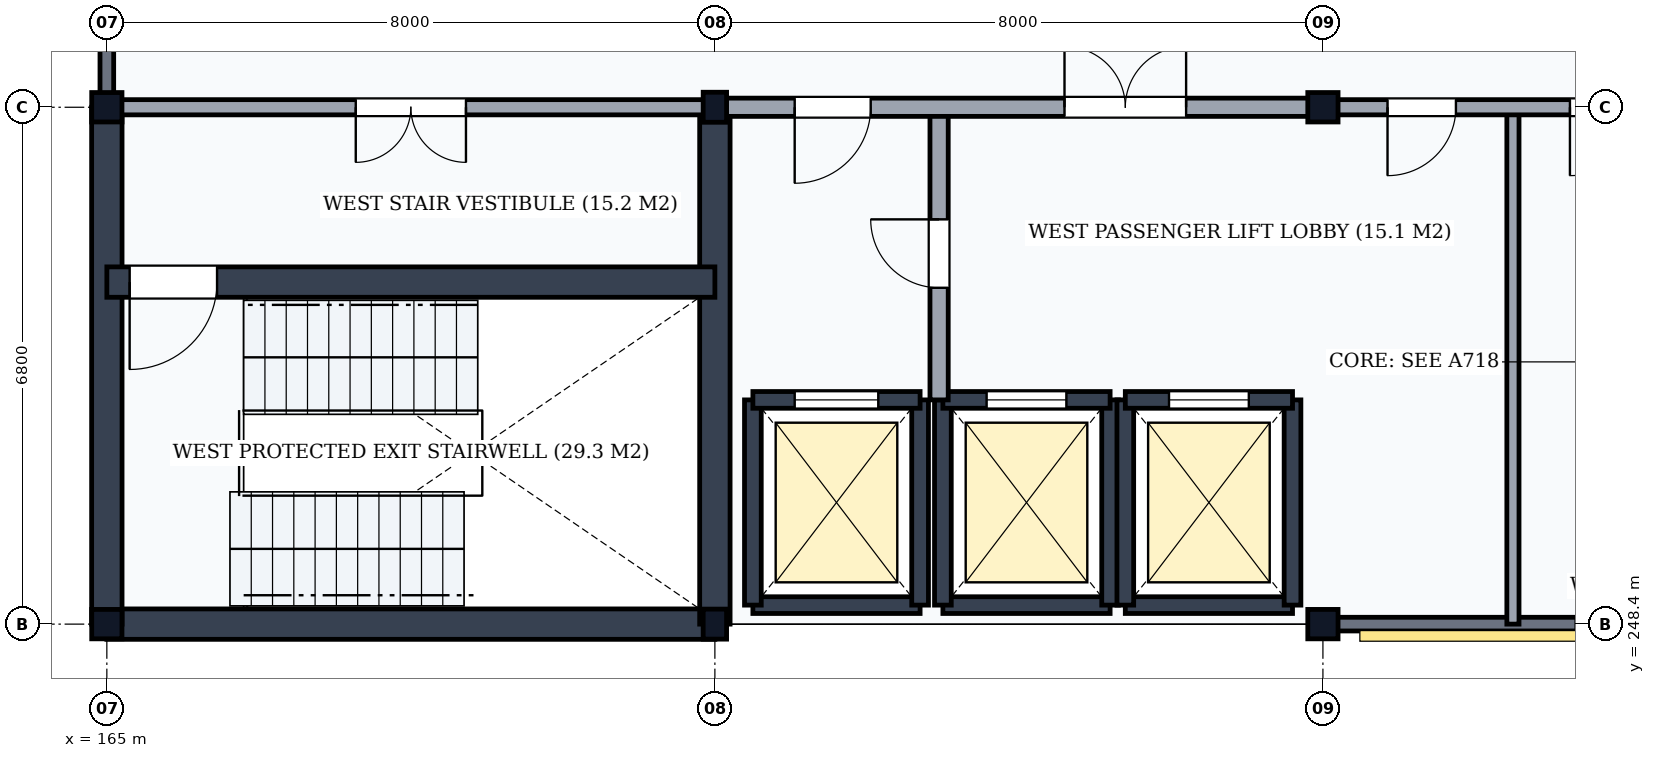
"""IFC4 building model, lengths in metres.
Left out: names, types, materials, properties, quantities, classifications, styles, units other than length and angle.
Written with IfcOpenShell. Run it as: python <this file> out.ifc"""

import sys

from ifc_helpers import new_model, si_unit, direction, frame, frame_2d, origin, origin_2d, place, context, subcontext, project, spatial, rectangle, i_section, extrude, element, fill, save


model = new_model("IFC4")
c1 = context("Model", 3, precision=1e-05, world=origin(), true_north=direction((0.0, 1.0)))
c2 = subcontext(c1, "Body", "Model", "MODEL_VIEW")
j1 = project(units=[si_unit("LENGTHUNIT", "METRE"), si_unit("PLANEANGLEUNIT", "RADIAN")], contexts=[c1])
p1 = place(None, origin())
s1 = spatial("IfcSite", under=j1, at=p1, CompositionType="ELEMENT")
p2 = place(p1, origin())
s2 = spatial("IfcBuilding", under=s1, at=p2, CompositionType="ELEMENT")
p3 = place(p2, frame((0.0, 0.0, 32.1)))
s3 = spatial("IfcBuildingStorey", under=s2, at=p3, CompositionType="ELEMENT", Elevation=32.1)
for number, where, z_axis, x_axis in (
    (1, (165.0, 248.4, 0.0), (0.0, 0.0, 1.0), (1.0, 0.0, 0.0)),
    (2, (165.0, 255.2, 0.0), (0.0, 0.0, 1.0), (1.0, 0.0, 0.0)),
):
    element("IfcColumn", number, at=place(p3, frame(where, z_axis=z_axis, x_axis=x_axis)), inside=s3, PredefinedType="COLUMN", context=c2, shape_type="SweptSolid", body=[
        extrude(i_section(OverallWidth=0.398, OverallDepth=0.387, WebThickness=0.021, FlangeThickness=0.033, FilletRadius=0.015, at=origin_2d()), origin(), (0.0, 0.0, 1.0), 3.9),
    ])
for number, where, z_axis, x_axis in (
    (3, (173.0, 248.4, 0.0), (0.0, 0.0, 1.0), (1.0, 0.0, 0.0)),
    (4, (173.0, 255.2, 0.0), (0.0, 0.0, 1.0), (1.0, 0.0, 0.0)),
):
    element("IfcColumn", number, at=place(p3, frame(where, z_axis=z_axis, x_axis=x_axis)), inside=s3, PredefinedType="COLUMN", context=c2, shape_type="SweptSolid", body=[
        extrude(i_section(OverallWidth=0.308, OverallDepth=0.395, WebThickness=0.021, FlangeThickness=0.04, FilletRadius=0.027, at=origin_2d()), origin(), (0.0, 0.0, 1.0), 3.9),
    ])
for number, where, z_axis, x_axis in (
    (5, (181.0, 248.4, 0.0), (0.0, 0.0, 1.0), (1.0, 0.0, 0.0)),
    (6, (181.0, 255.2, 0.0), (0.0, 0.0, 1.0), (1.0, 0.0, 0.0)),
):
    element("IfcColumn", number, at=place(p3, frame(where, z_axis=z_axis, x_axis=x_axis)), inside=s3, PredefinedType="COLUMN", context=c2, shape_type="SweptSolid", body=[
        extrude(i_section(OverallWidth=0.398, OverallDepth=0.387, WebThickness=0.021, FlangeThickness=0.033, FilletRadius=0.015, at=origin_2d()), origin(), (0.0, 0.0, 1.0), 3.9),
    ])
p4 = place(p3, frame((181.006, 248.4, 0.0), z_axis=(0.0, 0.0, 1.0), x_axis=(1.0, 0.0, 0.0)))
e7 = element("IfcWall", 7, at=p4, inside=s3, PredefinedType="SOLIDWALL", context=c2, shape_type="SweptSolid", body=[
    extrude(rectangle(XDim=7.988, YDim=0.18, at=frame_2d((3.994, 0.0))), origin(), (0.0, 0.0, 1.0), 3.368),
])
p5 = place(p4, frame((3.319, 0.0, 0.85)))
e8 = element("IfcOpeningElement", 8, at=p5, cuts=e7, PredefinedType="OPENING", context=c2, shape_type="SweptSolid", body=[
    extrude(rectangle(XDim=0.75, YDim=2.0, at=frame_2d((0.375, 1.0))), frame((0.0, 0.105, 0.0), z_axis=(0.0, -1.0, 0.0), x_axis=(1.0, 0.0, 0.0)), (0.0, 0.0, 1.0), 0.21),
])
p6 = place(p3, frame((165.0, 255.206, 0.0), z_axis=(0.0, 0.0, 1.0), x_axis=(0.0, 1.0, 0.0)))
e9 = element("IfcWall", 9, at=p6, inside=s3, PredefinedType="SOLIDWALL", context=c2, shape_type="SweptSolid", body=[
    extrude(rectangle(XDim=7.588, YDim=0.18, at=frame_2d((3.794, 0.0))), origin(), (0.0, 0.0, 1.0), 3.408),
])
p7 = place(p3, frame((165.0, 248.4, 0.0), z_axis=(0.0, 0.0, 1.0), x_axis=(1.0, 0.0, 0.0)))
e10 = element("IfcWall", 10, at=p7, inside=s3, PredefinedType="SHEAR", context=c2, shape_type="SweptSolid", body=[
    extrude(rectangle(XDim=8.0, YDim=0.4, at=frame_2d((4.0, 0.0))), origin(), (0.0, 0.0, 1.0), 3.68),
])
for number, where, z_axis, x_axis in (
    (11, (165.0, 248.4, 0.0), (0.0, 0.0, 1.0), (0.0, 1.0, 0.0)),
    (12, (173.0, 248.4, 0.0), (0.0, 0.0, 1.0), (0.0, 1.0, 0.0)),
):
    element("IfcWall", number, at=place(p3, frame(where, z_axis=z_axis, x_axis=x_axis)), inside=s3, PredefinedType="SHEAR", context=c2, shape_type="SweptSolid", body=[
        extrude(rectangle(XDim=6.8, YDim=0.4, at=frame_2d((3.4, 0.0))), origin(), (0.0, 0.0, 1.0), 3.68),
    ])
p8 = place(p3, frame((165.0, 252.9, 0.0), z_axis=(0.0, 0.0, 1.0), x_axis=(1.0, 0.0, 0.0)))
e13 = element("IfcWall", 13, at=p8, inside=s3, PredefinedType="SHEAR", context=c2, shape_type="SweptSolid", body=[
    extrude(rectangle(XDim=8.0, YDim=0.4, at=frame_2d((4.0, 0.0))), origin(), (0.0, 0.0, 1.0), 3.68),
])
p9 = place(p8, frame((0.3, 0.0, 0.0)))
e14 = element("IfcOpeningElement", 14, at=p9, cuts=e13, PredefinedType="OPENING", context=c2, shape_type="SweptSolid", body=[
    extrude(rectangle(XDim=1.15, YDim=2.15, at=frame_2d((0.575, 1.075))), frame((0.0, 0.215, 0.0), z_axis=(0.0, -1.0, 0.0), x_axis=(1.0, 0.0, 0.0)), (0.0, 0.0, 1.0), 0.43),
])
p10 = place(p3, frame((165.0, 255.2, 0.0), z_axis=(0.0, 0.0, 1.0), x_axis=(1.0, 0.0, 0.0)))
e15 = element("IfcWall", 15, at=p10, inside=s3, PredefinedType="PARTITIONING", context=c2, shape_type="SweptSolid", body=[
    extrude(rectangle(XDim=8.0, YDim=0.2, at=frame_2d((4.0, 0.0))), origin(), (0.0, 0.0, 1.0), 3.078),
])
p11 = place(p10, frame((3.275, 0.0, 0.0)))
e16 = element("IfcOpeningElement", 16, at=p11, cuts=e15, PredefinedType="OPENING", context=c2, shape_type="SweptSolid", body=[
    extrude(rectangle(XDim=1.45, YDim=2.2, at=frame_2d((0.725, 1.1))), frame((0.0, 0.115, 0.0), z_axis=(0.0, -1.0, 0.0), x_axis=(1.0, 0.0, 0.0)), (0.0, 0.0, 1.0), 0.23),
])
p12 = place(p3, frame((173.5, 248.65, 0.0), z_axis=(0.0, 0.0, 1.0), x_axis=(1.0, 0.0, 0.0)))
e17 = element("IfcWall", 17, at=p12, inside=s3, PredefinedType="SHEAR", context=c2, shape_type="SweptSolid", body=[
    extrude(rectangle(XDim=2.2, YDim=0.22, at=frame_2d((1.1, 0.0))), origin(), (0.0, 0.0, 1.0), 3.68),
])
for number, where, z_axis, x_axis in (
    (18, (173.5, 248.65, 0.0), (0.0, 0.0, 1.0), (0.0, 1.0, 0.0)),
    (19, (175.7, 248.65, 0.0), (0.0, 0.0, 1.0), (0.0, 1.0, 0.0)),
):
    element("IfcWall", number, at=place(p3, frame(where, z_axis=z_axis, x_axis=x_axis)), inside=s3, PredefinedType="SHEAR", context=c2, shape_type="SweptSolid", body=[
        extrude(rectangle(XDim=2.7, YDim=0.22, at=frame_2d((1.35, 0.0))), origin(), (0.0, 0.0, 1.0), 3.68),
    ])
p13 = place(p3, frame((173.5, 251.35, 0.0), z_axis=(0.0, 0.0, 1.0), x_axis=(1.0, 0.0, 0.0)))
e20 = element("IfcWall", 20, at=p13, inside=s3, PredefinedType="SHEAR", context=c2, shape_type="SweptSolid", body=[
    extrude(rectangle(XDim=2.2, YDim=0.22, at=frame_2d((1.1, 0.0))), origin(), (0.0, 0.0, 1.0), 3.68),
])
p14 = place(p13, frame((0.55, 0.0, 0.0)))
e21 = element("IfcOpeningElement", 21, at=p14, cuts=e20, PredefinedType="OPENING", context=c2, shape_type="SweptSolid", body=[
    extrude(rectangle(XDim=1.1, YDim=2.15, at=frame_2d((0.55, 1.075))), frame((0.0, 0.125, 0.0), z_axis=(0.0, -1.0, 0.0), x_axis=(1.0, 0.0, 0.0)), (0.0, 0.0, 1.0), 0.25),
])
p15 = place(p3, frame((176.0, 248.65, 0.0), z_axis=(0.0, 0.0, 1.0), x_axis=(1.0, 0.0, 0.0)))
e22 = element("IfcWall", 22, at=p15, inside=s3, PredefinedType="SHEAR", context=c2, shape_type="SweptSolid", body=[
    extrude(rectangle(XDim=2.2, YDim=0.22, at=frame_2d((1.1, 0.0))), origin(), (0.0, 0.0, 1.0), 3.68),
])
for number, where, z_axis, x_axis in (
    (23, (176.0, 248.65, 0.0), (0.0, 0.0, 1.0), (0.0, 1.0, 0.0)),
    (24, (178.2, 248.65, 0.0), (0.0, 0.0, 1.0), (0.0, 1.0, 0.0)),
):
    element("IfcWall", number, at=place(p3, frame(where, z_axis=z_axis, x_axis=x_axis)), inside=s3, PredefinedType="SHEAR", context=c2, shape_type="SweptSolid", body=[
        extrude(rectangle(XDim=2.7, YDim=0.22, at=frame_2d((1.35, 0.0))), origin(), (0.0, 0.0, 1.0), 3.68),
    ])
p16 = place(p3, frame((176.0, 251.35, 0.0), z_axis=(0.0, 0.0, 1.0), x_axis=(1.0, 0.0, 0.0)))
e25 = element("IfcWall", 25, at=p16, inside=s3, PredefinedType="SHEAR", context=c2, shape_type="SweptSolid", body=[
    extrude(rectangle(XDim=2.2, YDim=0.22, at=frame_2d((1.1, 0.0))), origin(), (0.0, 0.0, 1.0), 3.68),
])
p17 = place(p16, frame((0.575, 0.0, 0.0)))
e26 = element("IfcOpeningElement", 26, at=p17, cuts=e25, PredefinedType="OPENING", context=c2, shape_type="SweptSolid", body=[
    extrude(rectangle(XDim=1.05, YDim=2.15, at=frame_2d((0.525, 1.075))), frame((0.0, 0.125, 0.0), z_axis=(0.0, -1.0, 0.0), x_axis=(1.0, 0.0, 0.0)), (0.0, 0.0, 1.0), 0.25),
])
p18 = place(p3, frame((178.4, 248.65, 0.0), z_axis=(0.0, 0.0, 1.0), x_axis=(1.0, 0.0, 0.0)))
e27 = element("IfcWall", 27, at=p18, inside=s3, PredefinedType="SHEAR", context=c2, shape_type="SweptSolid", body=[
    extrude(rectangle(XDim=2.2, YDim=0.22, at=frame_2d((1.1, 0.0))), origin(), (0.0, 0.0, 1.0), 3.68),
])
for number, where, z_axis, x_axis in (
    (28, (178.4, 248.65, 0.0), (0.0, 0.0, 1.0), (0.0, 1.0, 0.0)),
    (29, (180.6, 248.65, 0.0), (0.0, 0.0, 1.0), (0.0, 1.0, 0.0)),
):
    element("IfcWall", number, at=place(p3, frame(where, z_axis=z_axis, x_axis=x_axis)), inside=s3, PredefinedType="SHEAR", context=c2, shape_type="SweptSolid", body=[
        extrude(rectangle(XDim=2.7, YDim=0.22, at=frame_2d((1.35, 0.0))), origin(), (0.0, 0.0, 1.0), 3.68),
    ])
p19 = place(p3, frame((178.4, 251.35, 0.0), z_axis=(0.0, 0.0, 1.0), x_axis=(1.0, 0.0, 0.0)))
e30 = element("IfcWall", 30, at=p19, inside=s3, PredefinedType="SHEAR", context=c2, shape_type="SweptSolid", body=[
    extrude(rectangle(XDim=2.2, YDim=0.22, at=frame_2d((1.1, 0.0))), origin(), (0.0, 0.0, 1.0), 3.68),
])
p20 = place(p19, frame((0.575, 0.0, 0.0)))
e31 = element("IfcOpeningElement", 31, at=p20, cuts=e30, PredefinedType="OPENING", context=c2, shape_type="SweptSolid", body=[
    extrude(rectangle(XDim=1.05, YDim=2.15, at=frame_2d((0.525, 1.075))), frame((0.0, 0.125, 0.0), z_axis=(0.0, -1.0, 0.0), x_axis=(1.0, 0.0, 0.0)), (0.0, 0.0, 1.0), 0.25),
])
p21 = place(p3, frame((175.95, 251.35, 0.0), z_axis=(0.0, 0.0, 1.0), x_axis=(0.0, 1.0, 0.0)))
e32 = element("IfcWall", 32, at=p21, inside=s3, PredefinedType="PARTITIONING", context=c2, shape_type="SweptSolid", body=[
    extrude(rectangle(XDim=3.85, YDim=0.24, at=frame_2d((1.925, 0.0))), origin(), (0.0, 0.0, 1.0), 3.68),
])
p22 = place(p21, frame((1.475, 0.0, 0.0)))
e33 = element("IfcOpeningElement", 33, at=p22, cuts=e32, PredefinedType="OPENING", context=c2, shape_type="SweptSolid", body=[
    extrude(rectangle(XDim=0.9, YDim=2.1, at=frame_2d((0.45, 1.05))), frame((0.0, 0.135, 0.0), z_axis=(0.0, -1.0, 0.0), x_axis=(1.0, 0.0, 0.0)), (0.0, 0.0, 1.0), 0.27),
])
p23 = place(p3, frame((183.5, 248.4, 0.0), z_axis=(0.0, 0.0, 1.0), x_axis=(0.0, 1.0, 0.0)))
e34 = element("IfcWall", 34, at=p23, inside=s3, PredefinedType="PARTITIONING", context=c2, shape_type="SweptSolid", body=[
    extrude(rectangle(XDim=6.8, YDim=0.16, at=frame_2d((3.4, 0.0))), origin(), (0.0, 0.0, 1.0), 3.68),
])
p24 = place(p3, frame((173.0, 255.2, 0.0), z_axis=(0.0, 0.0, 1.0), x_axis=(1.0, 0.0, 0.0)))
e35 = element("IfcWall", 35, at=p24, inside=s3, PredefinedType="PARTITIONING", context=c2, shape_type="SweptSolid", body=[
    extrude(rectangle(XDim=8.0, YDim=0.24, at=frame_2d((4.0, 0.0))), origin(), (0.0, 0.0, 1.0), 3.078),
])
p25 = place(p24, frame((1.05, 0.0, 0.0)))
e36 = element("IfcOpeningElement", 36, at=p25, cuts=e35, PredefinedType="OPENING", context=c2, shape_type="SweptSolid", body=[
    extrude(rectangle(XDim=1.0, YDim=2.1, at=frame_2d((0.5, 1.05))), frame((0.0, 0.135, 0.0), z_axis=(0.0, -1.0, 0.0), x_axis=(1.0, 0.0, 0.0)), (0.0, 0.0, 1.0), 0.27),
])
p26 = place(p24, frame((4.6, 0.0, 0.0)))
e37 = element("IfcOpeningElement", 37, at=p26, cuts=e35, PredefinedType="OPENING", context=c2, shape_type="SweptSolid", body=[
    extrude(rectangle(XDim=1.6, YDim=2.25, at=frame_2d((0.8, 1.125))), frame((0.0, 0.135, 0.0), z_axis=(0.0, -1.0, 0.0), x_axis=(1.0, 0.0, 0.0)), (0.0, 0.0, 1.0), 0.27),
])
p27 = place(p3, frame((181.0, 255.2, 0.0), z_axis=(0.0, 0.0, 1.0), x_axis=(1.0, 0.0, 0.0)))
e38 = element("IfcWall", 38, at=p27, inside=s3, PredefinedType="PARTITIONING", context=c2, shape_type="SweptSolid", body=[
    extrude(rectangle(XDim=8.0, YDim=0.2, at=frame_2d((4.0, 0.0))), origin(), (0.0, 0.0, 1.0), 3.078),
])
p28 = place(p27, frame((0.85, 0.0, 0.0)))
e39 = element("IfcOpeningElement", 39, at=p28, cuts=e38, PredefinedType="OPENING", context=c2, shape_type="SweptSolid", body=[
    extrude(rectangle(XDim=0.9, YDim=2.1, at=frame_2d((0.45, 1.05))), frame((0.0, 0.115, 0.0), z_axis=(0.0, -1.0, 0.0), x_axis=(1.0, 0.0, 0.0)), (0.0, 0.0, 1.0), 0.23),
])
p29 = place(p27, frame((3.25, 0.0, 0.0)))
e40 = element("IfcOpeningElement", 40, at=p29, cuts=e38, PredefinedType="OPENING", context=c2, shape_type="SweptSolid", body=[
    extrude(rectangle(XDim=0.9, YDim=2.1, at=frame_2d((0.45, 1.05))), frame((0.0, 0.115, 0.0), z_axis=(0.0, -1.0, 0.0), x_axis=(1.0, 0.0, 0.0)), (0.0, 0.0, 1.0), 0.23),
])
p30 = place(p27, frame((5.075, 0.0, 0.0)))
e41 = element("IfcOpeningElement", 41, at=p30, cuts=e38, PredefinedType="OPENING", context=c2, shape_type="SweptSolid", body=[
    extrude(rectangle(XDim=0.95, YDim=2.1, at=frame_2d((0.475, 1.05))), frame((0.0, 0.115, 0.0), z_axis=(0.0, -1.0, 0.0), x_axis=(1.0, 0.0, 0.0)), (0.0, 0.0, 1.0), 0.23),
])
p31 = place(p27, frame((6.5, 0.0, 0.0)))
e42 = element("IfcOpeningElement", 42, at=p31, cuts=e38, PredefinedType="OPENING", context=c2, shape_type="SweptSolid", body=[
    extrude(rectangle(XDim=0.85, YDim=2.1, at=frame_2d((0.425, 1.05))), frame((0.0, 0.115, 0.0), z_axis=(0.0, -1.0, 0.0), x_axis=(1.0, 0.0, 0.0)), (0.0, 0.0, 1.0), 0.23),
])
p32 = place(p9, frame((1.15, 0.0, 0.0), z_axis=(0.0, 0.0, 1.0), x_axis=(-1.0, 0.0, 0.0)))
e43 = element("IfcDoor", 43, at=p32, inside=s3, OperationType="SINGLE_SWING_RIGHT", PredefinedType="DOOR", context=c2, shape_type="SweptSolid", body=[
    extrude(rectangle(XDim=1.15, YDim=2.15, at=frame_2d((0.575, 1.075))), frame((0.0, 0.025, 0.0), z_axis=(0.0, -1.0, 0.0), x_axis=(1.0, 0.0, 0.0)), (0.0, 0.0, 1.0), 0.05),
])
fill(e14, e43)
p33 = place(p11, frame((1.45, 0.0, 0.0), z_axis=(0.0, 0.0, 1.0), x_axis=(-1.0, 0.0, 0.0)))
e44 = element("IfcDoor", 44, at=p33, inside=s3, OperationType="DOUBLE_DOOR_SINGLE_SWING", PredefinedType="DOOR", context=c2, shape_type="SweptSolid", body=[
    extrude(rectangle(XDim=1.45, YDim=2.2, at=frame_2d((0.725, 1.1))), frame((0.0, 0.025, 0.0), z_axis=(0.0, -1.0, 0.0), x_axis=(1.0, 0.0, 0.0)), (0.0, 0.0, 1.0), 0.05),
])
fill(e16, e44)
p34 = place(p14, origin())
e45 = element("IfcDoor", 45, at=p34, inside=s3, OperationType="DOUBLE_DOOR_SLIDING", PredefinedType="USERDEFINED", context=c2, shape_type="SweptSolid", body=[
    extrude(rectangle(XDim=1.1, YDim=2.15, at=frame_2d((0.55, 1.075))), frame((0.0, 0.025, 0.0), z_axis=(0.0, -1.0, 0.0), x_axis=(1.0, 0.0, 0.0)), (0.0, 0.0, 1.0), 0.05),
])
fill(e21, e45)
p35 = place(p17, origin())
e46 = element("IfcDoor", 46, at=p35, inside=s3, OperationType="DOUBLE_DOOR_SLIDING", PredefinedType="USERDEFINED", context=c2, shape_type="SweptSolid", body=[
    extrude(rectangle(XDim=1.05, YDim=2.15, at=frame_2d((0.525, 1.075))), frame((0.0, 0.025, 0.0), z_axis=(0.0, -1.0, 0.0), x_axis=(1.0, 0.0, 0.0)), (0.0, 0.0, 1.0), 0.05),
])
fill(e26, e46)
p36 = place(p20, origin())
e47 = element("IfcDoor", 47, at=p36, inside=s3, OperationType="DOUBLE_DOOR_SLIDING", PredefinedType="USERDEFINED", context=c2, shape_type="SweptSolid", body=[
    extrude(rectangle(XDim=1.05, YDim=2.15, at=frame_2d((0.525, 1.075))), frame((0.0, 0.025, 0.0), z_axis=(0.0, -1.0, 0.0), x_axis=(1.0, 0.0, 0.0)), (0.0, 0.0, 1.0), 0.05),
])
fill(e31, e47)
p37 = place(p22, frame((0.9, 0.0, 0.0), z_axis=(0.0, 0.0, 1.0), x_axis=(-1.0, 0.0, 0.0)))
e48 = element("IfcDoor", 48, at=p37, inside=s3, OperationType="SINGLE_SWING_LEFT", PredefinedType="DOOR", context=c2, shape_type="SweptSolid", body=[
    extrude(rectangle(XDim=0.9, YDim=2.1, at=frame_2d((0.45, 1.05))), frame((0.0, 0.025, 0.0), z_axis=(0.0, -1.0, 0.0), x_axis=(1.0, 0.0, 0.0)), (0.0, 0.0, 1.0), 0.05),
])
fill(e33, e48)
p38 = place(p25, frame((1.0, 0.0, 0.0), z_axis=(0.0, 0.0, 1.0), x_axis=(-1.0, 0.0, 0.0)))
e49 = element("IfcDoor", 49, at=p38, inside=s3, OperationType="SINGLE_SWING_RIGHT", PredefinedType="DOOR", context=c2, shape_type="SweptSolid", body=[
    extrude(rectangle(XDim=1.0, YDim=2.1, at=frame_2d((0.5, 1.05))), frame((0.0, 0.025, 0.0), z_axis=(0.0, -1.0, 0.0), x_axis=(1.0, 0.0, 0.0)), (0.0, 0.0, 1.0), 0.05),
])
fill(e36, e49)
p39 = place(p26, origin())
e50 = element("IfcDoor", 50, at=p39, inside=s3, OperationType="DOUBLE_DOOR_SINGLE_SWING", PredefinedType="DOOR", context=c2, shape_type="SweptSolid", body=[
    extrude(rectangle(XDim=1.6, YDim=2.25, at=frame_2d((0.8, 1.125))), frame((0.0, 0.025, 0.0), z_axis=(0.0, -1.0, 0.0), x_axis=(1.0, 0.0, 0.0)), (0.0, 0.0, 1.0), 0.05),
])
fill(e37, e50)
p40 = place(p28, frame((0.9, 0.0, 0.0), z_axis=(0.0, 0.0, 1.0), x_axis=(-1.0, 0.0, 0.0)))
e51 = element("IfcDoor", 51, at=p40, inside=s3, OperationType="SINGLE_SWING_RIGHT", PredefinedType="DOOR", context=c2, shape_type="SweptSolid", body=[
    extrude(rectangle(XDim=0.9, YDim=2.1, at=frame_2d((0.45, 1.05))), frame((0.0, 0.025, 0.0), z_axis=(0.0, -1.0, 0.0), x_axis=(1.0, 0.0, 0.0)), (0.0, 0.0, 1.0), 0.05),
])
fill(e39, e51)
p41 = place(p29, frame((0.9, 0.0, 0.0), z_axis=(0.0, 0.0, 1.0), x_axis=(-1.0, 0.0, 0.0)))
e52 = element("IfcDoor", 52, at=p41, inside=s3, OperationType="SINGLE_SWING_RIGHT", PredefinedType="DOOR", context=c2, shape_type="SweptSolid", body=[
    extrude(rectangle(XDim=0.9, YDim=2.1, at=frame_2d((0.45, 1.05))), frame((0.0, 0.025, 0.0), z_axis=(0.0, -1.0, 0.0), x_axis=(1.0, 0.0, 0.0)), (0.0, 0.0, 1.0), 0.05),
])
fill(e40, e52)
save(model, sys.argv[1])
